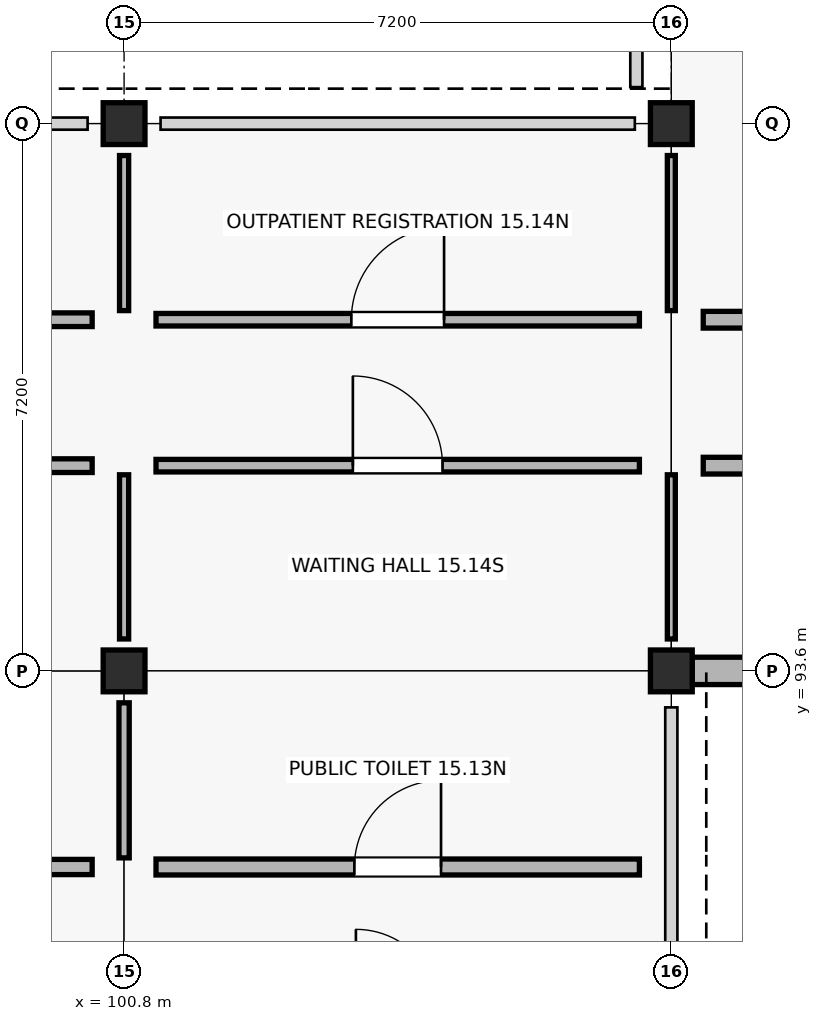
"""IFC4 building model, lengths in metres.
Left out: names, types, materials, properties, quantities, classifications, styles, units other than length and angle.
Written with IfcOpenShell. Run it as: python <this file> out.ifc"""

import sys

from ifc_helpers import new_model, si_unit, direction, frame, frame_2d, origin, origin_2d, place, context, subcontext, project, spatial, rectangle, extrude, element, fill, save


model = new_model("IFC4")
c1 = context("Model", 3, precision=1e-05, world=origin(), true_north=direction((0.0, 1.0)))
c2 = subcontext(c1, "Body", "Model", "MODEL_VIEW")
j1 = project(units=[si_unit("LENGTHUNIT", "METRE"), si_unit("PLANEANGLEUNIT", "RADIAN")], contexts=[c1])
p1 = place(None, origin())
s1 = spatial("IfcSite", under=j1, at=p1, CompositionType="ELEMENT")
p2 = place(p1, origin())
s2 = spatial("IfcBuilding", under=s1, at=p2, CompositionType="ELEMENT")
p3 = place(p2, origin())
s3 = spatial("IfcBuildingStorey", under=s2, at=p3, CompositionType="ELEMENT", Elevation=0.0)
for number, where, z_axis, x_axis in (
    (1, (100.8, 93.6, -0.25), (0.0, 0.0, 1.0), (1.0, 0.0, 0.0)),
    (2, (100.8, 100.8, -0.25), (0.0, 0.0, 1.0), (1.0, 0.0, 0.0)),
    (3, (108.0, 93.6, -0.25), (0.0, 0.0, 1.0), (1.0, 0.0, 0.0)),
    (4, (108.0, 100.8, -0.25), (0.0, 0.0, 1.0), (1.0, 0.0, 0.0)),
):
    element("IfcColumn", number, at=place(p3, frame(where, z_axis=z_axis, x_axis=x_axis)), inside=s3, PredefinedType="COLUMN", context=c2, shape_type="SweptSolid", body=[
        extrude(rectangle(XDim=0.55, YDim=0.55, at=origin_2d()), origin(), (0.0, 0.0, 1.0), 4.75),
    ])
p4 = place(p3, frame((108.275, 93.6, 0.0), z_axis=(0.0, 0.0, 1.0), x_axis=(1.0, 0.0, 0.0)))
e5 = element("IfcWall", 5, at=p4, inside=s3, PredefinedType="SOLIDWALL", context=c2, shape_type="SweptSolid", body=[
    extrude(rectangle(XDim=6.65, YDim=0.36, at=frame_2d((3.325, 0.0))), origin(), (0.0, 0.0, 1.0), 3.47),
])
p5 = place(p4, frame((0.675, 0.0, 0.9)))
e6 = element("IfcOpeningElement", 6, at=p5, cuts=e5, PredefinedType="OPENING", context=c2, shape_type="SweptSolid", body=[
    extrude(rectangle(XDim=2.15, YDim=1.5, at=frame_2d((1.075, 0.75))), frame((0.0, 0.19, 0.0), z_axis=(0.0, -1.0, 0.0), x_axis=(1.0, 0.0, 0.0)), (0.0, 0.0, 1.0), 0.38),
])
p6 = place(p4, frame((3.825, 0.0, 0.9)))
e7 = element("IfcOpeningElement", 7, at=p6, cuts=e5, PredefinedType="OPENING", context=c2, shape_type="SweptSolid", body=[
    extrude(rectangle(XDim=2.15, YDim=1.5, at=frame_2d((1.075, 0.75))), frame((0.0, 0.19, 0.0), z_axis=(0.0, -1.0, 0.0), x_axis=(1.0, 0.0, 0.0)), (0.0, 0.0, 1.0), 0.38),
])
p7 = place(p3, frame((94.02, 91.02, 0.0), z_axis=(0.0, 0.0, 1.0), x_axis=(1.0, 0.0, 0.0)))
e8 = element("IfcWall", 8, at=p7, inside=s3, PredefinedType="SOLIDWALL", context=c2, shape_type="SweptSolid", body=[
    extrude(rectangle(XDim=6.36, YDim=0.2, at=frame_2d((3.18, 0.0))), origin(), (0.0, 0.0, 1.0), 3.36),
])
p8 = place(p7, frame((2.73, 0.0, 0.0)))
e9 = element("IfcOpeningElement", 9, at=p8, cuts=e8, PredefinedType="OPENING", context=c2, shape_type="SweptSolid", body=[
    extrude(rectangle(XDim=0.9, YDim=2.09, at=frame_2d((0.45, 1.045))), frame((0.0, 0.11, 0.0), z_axis=(0.0, -1.0, 0.0), x_axis=(1.0, 0.0, 0.0)), (0.0, 0.0, 1.0), 0.22),
])
p9 = place(p3, frame((100.8, 91.14, 0.0), z_axis=(0.0, 0.0, 1.0), x_axis=(0.0, 1.0, 0.0)))
e10 = element("IfcWall", 10, at=p9, inside=s3, PredefinedType="PARTITIONING", context=c2, shape_type="SweptSolid", body=[
    extrude(rectangle(XDim=2.04, YDim=0.135, at=frame_2d((1.02, 0.0))), origin(), (0.0, 0.0, 1.0), 3.36),
])
p10 = place(p3, frame((94.02, 96.3, 0.0), z_axis=(0.0, 0.0, 1.0), x_axis=(1.0, 0.0, 0.0)))
e11 = element("IfcWall", 11, at=p10, inside=s3, PredefinedType="PARTITIONING", context=c2, shape_type="SweptSolid", body=[
    extrude(rectangle(XDim=6.36, YDim=0.18, at=frame_2d((3.18, 0.0))), origin(), (0.0, 0.0, 1.0), 3.36),
])
p11 = place(p10, frame((2.71, 0.0, 0.0)))
e12 = element("IfcOpeningElement", 12, at=p11, cuts=e11, PredefinedType="OPENING", context=c2, shape_type="SweptSolid", body=[
    extrude(rectangle(XDim=0.94, YDim=2.09, at=frame_2d((0.47, 1.045))), frame((0.0, 0.1, 0.0), z_axis=(0.0, -1.0, 0.0), x_axis=(1.0, 0.0, 0.0)), (0.0, 0.0, 1.0), 0.2),
])
p12 = place(p3, frame((100.8, 94.02, 0.0), z_axis=(0.0, 0.0, 1.0), x_axis=(0.0, 1.0, 0.0)))
e13 = element("IfcWall", 13, at=p12, inside=s3, PredefinedType="PARTITIONING", context=c2, shape_type="SweptSolid", body=[
    extrude(rectangle(XDim=2.16, YDim=0.12, at=frame_2d((1.08, 0.0))), origin(), (0.0, 0.0, 1.0), 3.36),
])
p13 = place(p3, frame((94.02, 98.22, 0.0), z_axis=(0.0, 0.0, 1.0), x_axis=(1.0, 0.0, 0.0)))
e14 = element("IfcWall", 14, at=p13, inside=s3, PredefinedType="PARTITIONING", context=c2, shape_type="SweptSolid", body=[
    extrude(rectangle(XDim=6.36, YDim=0.18, at=frame_2d((3.18, 0.0))), origin(), (0.0, 0.0, 1.0), 3.36),
])
p14 = place(p13, frame((2.69, 0.0, 0.0)))
e15 = element("IfcOpeningElement", 15, at=p14, cuts=e14, PredefinedType="OPENING", context=c2, shape_type="SweptSolid", body=[
    extrude(rectangle(XDim=0.98, YDim=2.09, at=frame_2d((0.49, 1.045))), frame((0.0, 0.1, 0.0), z_axis=(0.0, -1.0, 0.0), x_axis=(1.0, 0.0, 0.0)), (0.0, 0.0, 1.0), 0.2),
])
p15 = place(p3, frame((100.8, 98.34, 0.0), z_axis=(0.0, 0.0, 1.0), x_axis=(0.0, 1.0, 0.0)))
e16 = element("IfcWall", 16, at=p15, inside=s3, PredefinedType="PARTITIONING", context=c2, shape_type="SweptSolid", body=[
    extrude(rectangle(XDim=2.04, YDim=0.12, at=frame_2d((1.02, 0.0))), origin(), (0.0, 0.0, 1.0), 3.36),
])
p16 = place(p3, frame((101.22, 91.02, 0.0), z_axis=(0.0, 0.0, 1.0), x_axis=(1.0, 0.0, 0.0)))
e17 = element("IfcWall", 17, at=p16, inside=s3, PredefinedType="PLUMBINGWALL", context=c2, shape_type="SweptSolid", body=[
    extrude(rectangle(XDim=6.36, YDim=0.21, at=frame_2d((3.18, 0.0))), origin(), (0.0, 0.0, 1.0), 3.36),
])
p17 = place(p16, frame((2.61, 0.0, 0.0)))
e18 = element("IfcOpeningElement", 18, at=p17, cuts=e17, PredefinedType="OPENING", context=c2, shape_type="SweptSolid", body=[
    extrude(rectangle(XDim=1.14, YDim=2.09, at=frame_2d((0.57, 1.045))), frame((0.0, 0.115, 0.0), z_axis=(0.0, -1.0, 0.0), x_axis=(1.0, 0.0, 0.0)), (0.0, 0.0, 1.0), 0.23),
])
p18 = place(p3, frame((101.22, 96.3, 0.0), z_axis=(0.0, 0.0, 1.0), x_axis=(1.0, 0.0, 0.0)))
e19 = element("IfcWall", 19, at=p18, inside=s3, PredefinedType="PARTITIONING", context=c2, shape_type="SweptSolid", body=[
    extrude(rectangle(XDim=6.36, YDim=0.165, at=frame_2d((3.18, 0.0))), origin(), (0.0, 0.0, 1.0), 3.36),
])
p19 = place(p18, frame((2.59, 0.0, 0.0)))
e20 = element("IfcOpeningElement", 20, at=p19, cuts=e19, PredefinedType="OPENING", context=c2, shape_type="SweptSolid", body=[
    extrude(rectangle(XDim=1.18, YDim=2.09, at=frame_2d((0.59, 1.045))), frame((0.0, 0.093, 0.0), z_axis=(0.0, -1.0, 0.0), x_axis=(1.0, 0.0, 0.0)), (0.0, 0.0, 1.0), 0.185),
])
p20 = place(p3, frame((108.0, 94.02, 0.0), z_axis=(0.0, 0.0, 1.0), x_axis=(0.0, 1.0, 0.0)))
e21 = element("IfcWall", 21, at=p20, inside=s3, PredefinedType="PARTITIONING", context=c2, shape_type="SweptSolid", body=[
    extrude(rectangle(XDim=2.16, YDim=0.105, at=frame_2d((1.08, 0.0))), origin(), (0.0, 0.0, 1.0), 3.36),
])
p21 = place(p3, frame((101.22, 98.22, 0.0), z_axis=(0.0, 0.0, 1.0), x_axis=(1.0, 0.0, 0.0)))
e22 = element("IfcWall", 22, at=p21, inside=s3, PredefinedType="PARTITIONING", context=c2, shape_type="SweptSolid", body=[
    extrude(rectangle(XDim=6.36, YDim=0.165, at=frame_2d((3.18, 0.0))), origin(), (0.0, 0.0, 1.0), 3.36),
])
p22 = place(p21, frame((2.57, 0.0, 0.0)))
e23 = element("IfcOpeningElement", 23, at=p22, cuts=e22, PredefinedType="OPENING", context=c2, shape_type="SweptSolid", body=[
    extrude(rectangle(XDim=1.22, YDim=2.09, at=frame_2d((0.61, 1.045))), frame((0.0, 0.093, 0.0), z_axis=(0.0, -1.0, 0.0), x_axis=(1.0, 0.0, 0.0)), (0.0, 0.0, 1.0), 0.185),
])
p23 = place(p3, frame((108.0, 98.34, 0.0), z_axis=(0.0, 0.0, 1.0), x_axis=(0.0, 1.0, 0.0)))
e24 = element("IfcWall", 24, at=p23, inside=s3, PredefinedType="PARTITIONING", context=c2, shape_type="SweptSolid", body=[
    extrude(rectangle(XDim=2.04, YDim=0.105, at=frame_2d((1.02, 0.0))), origin(), (0.0, 0.0, 1.0), 3.36),
])
p24 = place(p3, frame((108.42, 96.3, 0.0), z_axis=(0.0, 0.0, 1.0), x_axis=(1.0, 0.0, 0.0)))
e25 = element("IfcWall", 25, at=p24, inside=s3, PredefinedType="SOLIDWALL", context=c2, shape_type="SweptSolid", body=[
    extrude(rectangle(XDim=6.36, YDim=0.22, at=frame_2d((3.18, 0.0))), origin(), (0.0, 0.0, 1.0), 3.36),
])
p25 = place(p24, frame((2.61, 0.0, 0.0)))
e26 = element("IfcOpeningElement", 26, at=p25, cuts=e25, PredefinedType="OPENING", context=c2, shape_type="SweptSolid", body=[
    extrude(rectangle(XDim=1.14, YDim=2.14, at=frame_2d((0.57, 1.07))), frame((0.0, 0.12, 0.0), z_axis=(0.0, -1.0, 0.0), x_axis=(1.0, 0.0, 0.0)), (0.0, 0.0, 1.0), 0.24),
])
p26 = place(p3, frame((108.42, 98.22, 0.0), z_axis=(0.0, 0.0, 1.0), x_axis=(1.0, 0.0, 0.0)))
e27 = element("IfcWall", 27, at=p26, inside=s3, PredefinedType="SOLIDWALL", context=c2, shape_type="SweptSolid", body=[
    extrude(rectangle(XDim=6.36, YDim=0.22, at=frame_2d((3.18, 0.0))), origin(), (0.0, 0.0, 1.0), 3.36),
])
p27 = place(p26, frame((2.59, 0.0, 0.0)))
e28 = element("IfcOpeningElement", 28, at=p27, cuts=e27, PredefinedType="OPENING", context=c2, shape_type="SweptSolid", body=[
    extrude(rectangle(XDim=1.18, YDim=2.14, at=frame_2d((0.59, 1.07))), frame((0.0, 0.12, 0.0), z_axis=(0.0, -1.0, 0.0), x_axis=(1.0, 0.0, 0.0)), (0.0, 0.0, 1.0), 0.24),
])
p28 = place(p17, origin())
e29 = element("IfcDoor", 29, at=p28, inside=s3, OperationType="SINGLE_SWING_RIGHT", PredefinedType="DOOR", context=c2, shape_type="SweptSolid", body=[
    extrude(rectangle(XDim=1.14, YDim=2.09, at=frame_2d((0.57, 1.045))), frame((0.0, 0.025, 0.0), z_axis=(0.0, -1.0, 0.0), x_axis=(1.0, 0.0, 0.0)), (0.0, 0.0, 1.0), 0.05),
])
fill(e18, e29)
p29 = place(p19, origin())
e30 = element("IfcDoor", 30, at=p29, inside=s3, OperationType="SINGLE_SWING_LEFT", PredefinedType="DOOR", context=c2, shape_type="SweptSolid", body=[
    extrude(rectangle(XDim=1.18, YDim=2.09, at=frame_2d((0.59, 1.045))), frame((0.0, 0.025, 0.0), z_axis=(0.0, -1.0, 0.0), x_axis=(1.0, 0.0, 0.0)), (0.0, 0.0, 1.0), 0.05),
])
fill(e20, e30)
p30 = place(p22, origin())
e31 = element("IfcDoor", 31, at=p30, inside=s3, OperationType="SINGLE_SWING_RIGHT", PredefinedType="DOOR", context=c2, shape_type="SweptSolid", body=[
    extrude(rectangle(XDim=1.22, YDim=2.09, at=frame_2d((0.61, 1.045))), frame((0.0, 0.025, 0.0), z_axis=(0.0, -1.0, 0.0), x_axis=(1.0, 0.0, 0.0)), (0.0, 0.0, 1.0), 0.05),
])
fill(e23, e31)
save(model, sys.argv[1])
